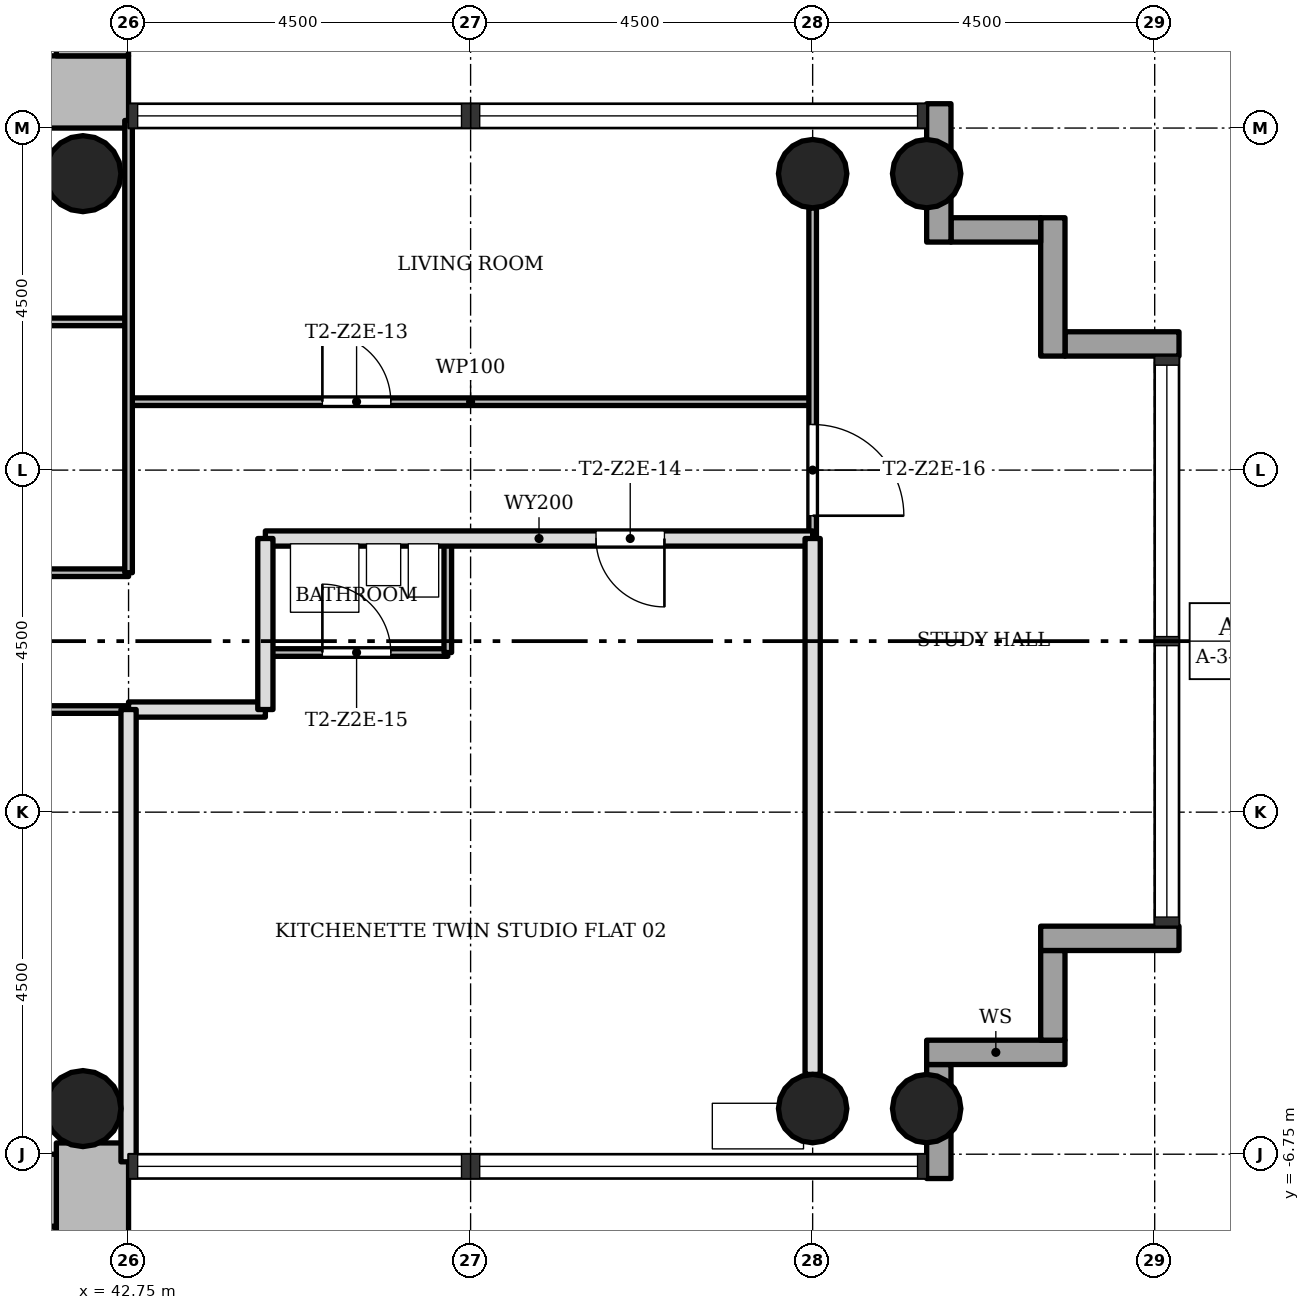
"""IFC4 building model, lengths in metres.
Left out: names, types, materials, properties, quantities, classifications, styles, units other than length and angle.
Written with IfcOpenShell. Run it as: python <this file> out.ifc"""

import sys

from ifc_helpers import new_model, si_unit, direction, frame, frame_2d, origin, origin_2d, place, context, subcontext, project, spatial, rectangle, hollow_circle, extrude, element, fill, save


model = new_model("IFC4")
c1 = context("Model", 3, precision=1e-05, world=origin(), true_north=direction((0.0, 1.0)))
c2 = subcontext(c1, "Body", "Model", "MODEL_VIEW")
j1 = project(units=[si_unit("LENGTHUNIT", "METRE"), si_unit("PLANEANGLEUNIT", "RADIAN")], contexts=[c1])
p1 = place(None, origin())
s1 = spatial("IfcSite", under=j1, at=p1, CompositionType="ELEMENT")
p2 = place(p1, origin())
s2 = spatial("IfcBuilding", under=s1, at=p2, CompositionType="ELEMENT")
p3 = place(p2, frame((0.0, 0.0, 103.8)))
s3 = spatial("IfcBuildingStorey", under=s2, at=p3, CompositionType="ELEMENT", Elevation=103.8)
p4 = place(p3, frame((30.2, 7.225, 0.0), z_axis=(0.0, 0.0, 1.0), x_axis=(1.0, 0.0, 0.0)))
e1 = element("IfcWall", 1, at=p4, inside=s3, PredefinedType="SHEAR", context=c2, shape_type="SweptSolid", body=[
    extrude(rectangle(XDim=12.55, YDim=0.95, at=frame_2d((6.275, 0.0))), origin(), (0.0, 0.0, 1.0), 3.4),
])
p5 = place(p4, frame((4.9, 0.0, 0.0)))
e2 = element("IfcOpeningElement", 2, at=p5, cuts=e1, PredefinedType="OPENING", context=c2, shape_type="SweptSolid", body=[
    extrude(rectangle(XDim=1.8, YDim=2.1, at=frame_2d((0.9, 1.05))), frame((0.0, 0.485, 0.0), z_axis=(0.0, -1.0, 0.0), x_axis=(1.0, 0.0, 0.0)), (0.0, 0.0, 1.0), 0.97),
])
p6 = place(p3, frame((42.275, 7.7, 0.0), z_axis=(0.0, 0.0, 1.0), x_axis=(0.0, 1.0, 0.0)))
e3 = element("IfcWall", 3, at=p6, inside=s3, PredefinedType="SHEAR", context=c2, shape_type="SweptSolid", body=[
    extrude(rectangle(XDim=8.05, YDim=0.95, at=frame_2d((4.025, 0.0))), origin(), (0.0, 0.0, 1.0), 3.4),
])
p7 = place(p3, frame((42.275, -14.8, 0.0), z_axis=(0.0, 0.0, 1.0), x_axis=(0.0, 1.0, 0.0)))
e4 = element("IfcWall", 4, at=p7, inside=s3, PredefinedType="SHEAR", context=c2, shape_type="SweptSolid", body=[
    extrude(rectangle(XDim=8.198, YDim=0.95, at=frame_2d((4.099, 0.0))), origin(), (0.0, 0.0, 1.0), 3.4),
])
p8 = place(p3, frame((41.8, -7.225, 0.0), z_axis=(0.0, 0.0, 1.0), x_axis=(-1.0, 0.0, 0.0)))
e5 = element("IfcWall", 5, at=p8, inside=s3, PredefinedType="SHEAR", context=c2, shape_type="SweptSolid", body=[
    extrude(rectangle(XDim=12.55, YDim=0.95, at=frame_2d((6.275, 0.0))), origin(), (0.0, 0.0, 1.0), 3.4),
])
p9 = place(p8, frame((4.9, 0.0, 0.0)))
e6 = element("IfcOpeningElement", 6, at=p9, cuts=e5, PredefinedType="OPENING", context=c2, shape_type="SweptSolid", body=[
    extrude(rectangle(XDim=1.8, YDim=2.1, at=frame_2d((0.9, 1.05))), frame((0.0, 0.485, 0.0), z_axis=(0.0, -1.0, 0.0), x_axis=(1.0, 0.0, 0.0)), (0.0, 0.0, 1.0), 0.97),
])
for number, where, z_axis, x_axis in (
    (7, (51.75, -6.15, 0.0), (0.0, 0.0, 1.0), (1.0, 0.0, 0.0)),
    (8, (51.75, 6.15, 0.0), (0.0, 0.0, 1.0), (1.0, 0.0, 0.0)),
    (9, (53.25, -6.15, 0.0), (0.0, 0.0, 1.0), (1.0, 0.0, 0.0)),
    (10, (53.25, 6.15, 0.0), (0.0, 0.0, 1.0), (1.0, 0.0, 0.0)),
):
    element("IfcColumn", number, at=place(p3, frame(where, z_axis=z_axis, x_axis=x_axis)), inside=s3, PredefinedType="COLUMN", context=c2, shape_type="SweptSolid", body=[
        extrude(hollow_circle(Radius=0.45, WallThickness=0.032, at=origin_2d()), origin(), (0.0, 0.0, 1.0), 3.4),
    ])
for number, where, z_axis, x_axis in (
    (11, (42.15, -6.15, 0.0), (0.0, 0.0, 1.0), (1.0, 0.0, 0.0)),
    (12, (42.15, 6.15, 0.0), (0.0, 0.0, 1.0), (1.0, 0.0, 0.0)),
):
    element("IfcColumn", number, at=place(p3, frame(where, z_axis=z_axis, x_axis=x_axis)), inside=s3, PredefinedType="COLUMN", context=c2, shape_type="SweptSolid", body=[
        extrude(hollow_circle(Radius=0.5, WallThickness=0.036, at=origin_2d()), origin(), (0.0, 0.0, 1.0), 3.4),
    ])
p10 = place(p3, frame((53.41, -7.07, -0.3), z_axis=(0.0, 0.0, 1.0), x_axis=(0.0, 1.0, 0.0)))
e13 = element("IfcWall", 13, at=p10, inside=s3, PredefinedType="STANDARD", context=c2, shape_type="SweptSolid", body=[
    extrude(rectangle(XDim=1.5, YDim=0.32, at=frame_2d((0.75, 0.0))), origin(), (0.0, 0.0, 1.0), 3.4),
])
p11 = place(p3, frame((53.25, -5.41, -0.3), z_axis=(0.0, 0.0, 1.0), x_axis=(1.0, 0.0, 0.0)))
e14 = element("IfcWall", 14, at=p11, inside=s3, PredefinedType="STANDARD", context=c2, shape_type="SweptSolid", body=[
    extrude(rectangle(XDim=1.82, YDim=0.32, at=frame_2d((0.91, 0.0))), origin(), (0.0, 0.0, 1.0), 3.4),
])
p12 = place(p3, frame((54.91, -5.25, -0.3), z_axis=(0.0, 0.0, 1.0), x_axis=(0.0, 1.0, 0.0)))
e15 = element("IfcWall", 15, at=p12, inside=s3, PredefinedType="STANDARD", context=c2, shape_type="SweptSolid", body=[
    extrude(rectangle(XDim=1.18, YDim=0.32, at=frame_2d((0.59, 0.0))), origin(), (0.0, 0.0, 1.0), 3.4),
])
p13 = place(p3, frame((54.75, -3.91, -0.3), z_axis=(0.0, 0.0, 1.0), x_axis=(1.0, 0.0, 0.0)))
e16 = element("IfcWall", 16, at=p13, inside=s3, PredefinedType="STANDARD", context=c2, shape_type="SweptSolid", body=[
    extrude(rectangle(XDim=1.82, YDim=0.32, at=frame_2d((0.91, 0.0))), origin(), (0.0, 0.0, 1.0), 3.4),
])
p14 = place(p3, frame((56.57, 3.91, -0.3), z_axis=(0.0, 0.0, 1.0), x_axis=(-1.0, 0.0, 0.0)))
e17 = element("IfcWall", 17, at=p14, inside=s3, PredefinedType="STANDARD", context=c2, shape_type="SweptSolid", body=[
    extrude(rectangle(XDim=1.5, YDim=0.32, at=frame_2d((0.75, 0.0))), origin(), (0.0, 0.0, 1.0), 3.4),
])
p15 = place(p3, frame((54.91, 3.75, -0.3), z_axis=(0.0, 0.0, 1.0), x_axis=(0.0, 1.0, 0.0)))
e18 = element("IfcWall", 18, at=p15, inside=s3, PredefinedType="STANDARD", context=c2, shape_type="SweptSolid", body=[
    extrude(rectangle(XDim=1.82, YDim=0.32, at=frame_2d((0.91, 0.0))), origin(), (0.0, 0.0, 1.0), 3.4),
])
p16 = place(p3, frame((54.75, 5.41, -0.3), z_axis=(0.0, 0.0, 1.0), x_axis=(-1.0, 0.0, 0.0)))
e19 = element("IfcWall", 19, at=p16, inside=s3, PredefinedType="STANDARD", context=c2, shape_type="SweptSolid", body=[
    extrude(rectangle(XDim=1.18, YDim=0.32, at=frame_2d((0.59, 0.0))), origin(), (0.0, 0.0, 1.0), 3.4),
])
p17 = place(p3, frame((53.41, 5.25, -0.3), z_axis=(0.0, 0.0, 1.0), x_axis=(0.0, 1.0, 0.0)))
e20 = element("IfcWall", 20, at=p17, inside=s3, PredefinedType="STANDARD", context=c2, shape_type="SweptSolid", body=[
    extrude(rectangle(XDim=1.82, YDim=0.32, at=frame_2d((0.91, 0.0))), origin(), (0.0, 0.0, 1.0), 3.4),
])
p18 = place(p3, frame((42.75, -0.9, 0.0), z_axis=(0.0, 0.0, 1.0), x_axis=(-1.0, 0.0, 0.0)))
e21 = element("IfcWall", 21, at=p18, inside=s3, PredefinedType="PARTITIONING", context=c2, shape_type="SweptSolid", body=[
    extrude(rectangle(XDim=5.25, YDim=0.1, at=frame_2d((2.625, 0.0))), origin(), (0.0, 0.0, 1.0), 3.0),
])
p19 = place(p18, frame((3.6, 0.0, 0.0)))
e22 = element("IfcOpeningElement", 22, at=p19, cuts=e21, PredefinedType="OPENING", context=c2, shape_type="SweptSolid", body=[
    extrude(rectangle(XDim=0.9, YDim=2.1, at=frame_2d((0.45, 1.05))), frame((0.0, 0.06, 0.0), z_axis=(0.0, -1.0, 0.0), x_axis=(1.0, 0.0, 0.0)), (0.0, 0.0, 1.0), 0.12),
])
p20 = place(p3, frame((44.55, -0.9, 0.0), z_axis=(0.0, 0.0, 1.0), x_axis=(-1.0, 0.0, 0.0)))
e23 = element("IfcWall", 23, at=p20, inside=s3, PredefinedType="SOLIDWALL", context=c2, shape_type="SweptSolid", body=[
    extrude(rectangle(XDim=1.8, YDim=0.2, at=frame_2d((0.9, 0.0))), origin(), (0.0, 0.0, 1.0), 3.0),
])
p21 = place(p3, frame((46.95, -0.15, 0.0), z_axis=(0.0, 0.0, 1.0), x_axis=(-1.0, 0.0, 0.0)))
e24 = element("IfcWall", 24, at=p21, inside=s3, PredefinedType="PARTITIONING", context=c2, shape_type="SweptSolid", body=[
    extrude(rectangle(XDim=2.4, YDim=0.1, at=frame_2d((1.2, 0.0))), origin(), (0.0, 0.0, 1.0), 3.0),
])
p22 = place(p21, frame((0.75, 0.0, 0.0)))
e25 = element("IfcOpeningElement", 25, at=p22, cuts=e24, PredefinedType="OPENING", context=c2, shape_type="SweptSolid", body=[
    extrude(rectangle(XDim=0.9, YDim=2.1, at=frame_2d((0.45, 1.05))), frame((0.0, 0.06, 0.0), z_axis=(0.0, -1.0, 0.0), x_axis=(1.0, 0.0, 0.0)), (0.0, 0.0, 1.0), 0.12),
])
p23 = place(p3, frame((42.75, 0.9, 0.0), z_axis=(0.0, 0.0, 1.0), x_axis=(-1.0, 0.0, 0.0)))
e26 = element("IfcWall", 26, at=p23, inside=s3, PredefinedType="PARTITIONING", context=c2, shape_type="SweptSolid", body=[
    extrude(rectangle(XDim=5.25, YDim=0.1, at=frame_2d((2.625, 0.0))), origin(), (0.0, 0.0, 1.0), 3.0),
])
p24 = place(p23, frame((2.175, 0.0, 0.0)))
e27 = element("IfcOpeningElement", 27, at=p24, cuts=e26, PredefinedType="OPENING", context=c2, shape_type="SweptSolid", body=[
    extrude(rectangle(XDim=0.9, YDim=2.1, at=frame_2d((0.45, 1.05))), frame((0.0, 0.06, 0.0), z_axis=(0.0, -1.0, 0.0), x_axis=(1.0, 0.0, 0.0)), (0.0, 0.0, 1.0), 0.12),
])
p25 = place(p3, frame((51.75, 1.35, 0.0), z_axis=(0.0, 0.0, 1.0), x_axis=(-1.0, 0.0, 0.0)))
e28 = element("IfcWall", 28, at=p25, inside=s3, PredefinedType="SOLIDWALL", context=c2, shape_type="SweptSolid", body=[
    extrude(rectangle(XDim=7.2, YDim=0.2, at=frame_2d((3.6, 0.0))), origin(), (0.0, 0.0, 1.0), 3.0),
])
p26 = place(p25, frame((1.95, 0.0, 0.0)))
e29 = element("IfcOpeningElement", 29, at=p26, cuts=e28, PredefinedType="OPENING", context=c2, shape_type="SweptSolid", body=[
    extrude(rectangle(XDim=0.9, YDim=2.1, at=frame_2d((0.45, 1.05))), frame((0.0, 0.11, 0.0), z_axis=(0.0, -1.0, 0.0), x_axis=(1.0, 0.0, 0.0)), (0.0, 0.0, 1.0), 0.22),
])
p27 = place(p3, frame((51.75, 3.15, 0.0), z_axis=(0.0, 0.0, 1.0), x_axis=(-1.0, 0.0, 0.0)))
e30 = element("IfcWall", 30, at=p27, inside=s3, PredefinedType="PARTITIONING", context=c2, shape_type="SweptSolid", body=[
    extrude(rectangle(XDim=9.0, YDim=0.1, at=frame_2d((4.5, 0.0))), origin(), (0.0, 0.0, 1.0), 3.0),
])
p28 = place(p27, frame((5.55, 0.0, 0.0)))
e31 = element("IfcOpeningElement", 31, at=p28, cuts=e30, PredefinedType="OPENING", context=c2, shape_type="SweptSolid", body=[
    extrude(rectangle(XDim=0.9, YDim=2.1, at=frame_2d((0.45, 1.05))), frame((0.0, 0.06, 0.0), z_axis=(0.0, -1.0, 0.0), x_axis=(1.0, 0.0, 0.0)), (0.0, 0.0, 1.0), 0.12),
])
p29 = place(p3, frame((42.75, 4.2, 0.0), z_axis=(0.0, 0.0, 1.0), x_axis=(-1.0, 0.0, 0.0)))
e32 = element("IfcWall", 32, at=p29, inside=s3, PredefinedType="PARTITIONING", context=c2, shape_type="SweptSolid", body=[
    extrude(rectangle(XDim=5.25, YDim=0.1, at=frame_2d((2.625, 0.0))), origin(), (0.0, 0.0, 1.0), 3.0),
])
p30 = place(p3, frame((51.75, 1.35, 0.0), z_axis=(0.0, 0.0, 1.0), x_axis=(0.0, 1.0, 0.0)))
e33 = element("IfcWall", 33, at=p30, inside=s3, PredefinedType="PARTITIONING", context=c2, shape_type="SweptSolid", body=[
    extrude(rectangle(XDim=4.35, YDim=0.1, at=frame_2d((2.175, 0.0))), origin(), (0.0, 0.0, 1.0), 3.0),
])
p31 = place(p30, frame((0.3, 0.0, 0.0)))
e34 = element("IfcOpeningElement", 34, at=p31, cuts=e33, PredefinedType="OPENING", context=c2, shape_type="SweptSolid", body=[
    extrude(rectangle(XDim=1.2, YDim=2.1, at=frame_2d((0.6, 1.05))), frame((0.0, 0.06, 0.0), z_axis=(0.0, -1.0, 0.0), x_axis=(1.0, 0.0, 0.0)), (0.0, 0.0, 1.0), 0.12),
])
p32 = place(p3, frame((51.75, -5.7, 0.0), z_axis=(0.0, 0.0, 1.0), x_axis=(0.0, 1.0, 0.0)))
e35 = element("IfcWall", 35, at=p32, inside=s3, PredefinedType="SOLIDWALL", context=c2, shape_type="SweptSolid", body=[
    extrude(rectangle(XDim=7.05, YDim=0.2, at=frame_2d((3.525, 0.0))), origin(), (0.0, 0.0, 1.0), 3.0),
])
p33 = place(p3, frame((46.95, -0.15, 0.0), z_axis=(0.0, 0.0, 1.0), x_axis=(0.0, 1.0, 0.0)))
e36 = element("IfcWall", 36, at=p33, inside=s3, PredefinedType="PARTITIONING", context=c2, shape_type="SweptSolid", body=[
    extrude(rectangle(XDim=1.5, YDim=0.1, at=frame_2d((0.75, 0.0))), origin(), (0.0, 0.0, 1.0), 3.0),
])
p34 = place(p3, frame((44.55, -0.9, 0.0), z_axis=(0.0, 0.0, 1.0), x_axis=(0.0, 1.0, 0.0)))
e37 = element("IfcWall", 37, at=p34, inside=s3, PredefinedType="SOLIDWALL", context=c2, shape_type="SweptSolid", body=[
    extrude(rectangle(XDim=2.25, YDim=0.2, at=frame_2d((1.125, 0.0))), origin(), (0.0, 0.0, 1.0), 3.0),
])
p35 = place(p3, frame((42.75, 0.9, 0.0), z_axis=(0.0, 0.0, 1.0), x_axis=(0.0, 1.0, 0.0)))
e38 = element("IfcWall", 38, at=p35, inside=s3, PredefinedType="PARTITIONING", context=c2, shape_type="SweptSolid", body=[
    extrude(rectangle(XDim=5.95, YDim=0.1, at=frame_2d((2.975, 0.0))), origin(), (0.0, 0.0, 1.0), 3.0),
])
p36 = place(p3, frame((42.75, -6.85, 0.0), z_axis=(0.0, 0.0, 1.0), x_axis=(0.0, 1.0, 0.0)))
e39 = element("IfcWall", 39, at=p36, inside=s3, PredefinedType="SOLIDWALL", context=c2, shape_type="SweptSolid", body=[
    extrude(rectangle(XDim=5.95, YDim=0.2, at=frame_2d((2.975, 0.0))), origin(), (0.0, 0.0, 1.0), 3.0),
])
p37 = place(p3, frame((37.9, -7.825, 0.0), z_axis=(0.0, 0.0, 1.0), x_axis=(1.0, 0.0, 0.0)))
e40 = element("IfcWall", 40, at=p37, inside=s3, PredefinedType="SHEAR", context=c2, shape_type="SweptSolid", body=[
    extrude(rectangle(XDim=3.9, YDim=0.25, at=frame_2d((1.95, 0.0))), origin(), (0.0, 0.0, 1.0), 3.4),
])
p38 = place(p28, origin())
e41 = element("IfcDoor", 41, at=p38, inside=s3, OperationType="SINGLE_SWING_RIGHT", PredefinedType="DOOR", context=c2, shape_type="SweptSolid", body=[
    extrude(rectangle(XDim=0.9, YDim=2.1, at=frame_2d((0.45, 1.05))), frame((0.0, 0.025, 0.0), z_axis=(0.0, -1.0, 0.0), x_axis=(1.0, 0.0, 0.0)), (0.0, 0.0, 1.0), 0.05),
])
fill(e31, e41)
p39 = place(p26, origin())
e42 = element("IfcDoor", 42, at=p39, inside=s3, OperationType="SINGLE_SWING_RIGHT", PredefinedType="DOOR", context=c2, shape_type="SweptSolid", body=[
    extrude(rectangle(XDim=0.9, YDim=2.1, at=frame_2d((0.45, 1.05))), frame((0.0, 0.025, 0.0), z_axis=(0.0, -1.0, 0.0), x_axis=(1.0, 0.0, 0.0)), (0.0, 0.0, 1.0), 0.05),
])
fill(e29, e42)
p40 = place(p22, origin())
e43 = element("IfcDoor", 43, at=p40, inside=s3, OperationType="SINGLE_SWING_RIGHT", PredefinedType="DOOR", context=c2, shape_type="SweptSolid", body=[
    extrude(rectangle(XDim=0.9, YDim=2.1, at=frame_2d((0.45, 1.05))), frame((0.0, 0.025, 0.0), z_axis=(0.0, -1.0, 0.0), x_axis=(1.0, 0.0, 0.0)), (0.0, 0.0, 1.0), 0.05),
])
fill(e25, e43)
p41 = place(p31, origin())
e44 = element("IfcDoor", 44, at=p41, inside=s3, OperationType="SINGLE_SWING_LEFT", PredefinedType="DOOR", context=c2, shape_type="SweptSolid", body=[
    extrude(rectangle(XDim=1.2, YDim=2.1, at=frame_2d((0.6, 1.05))), frame((0.0, 0.025, 0.0), z_axis=(0.0, -1.0, 0.0), x_axis=(1.0, 0.0, 0.0)), (0.0, 0.0, 1.0), 0.05),
])
fill(e34, e44)
save(model, sys.argv[1])
